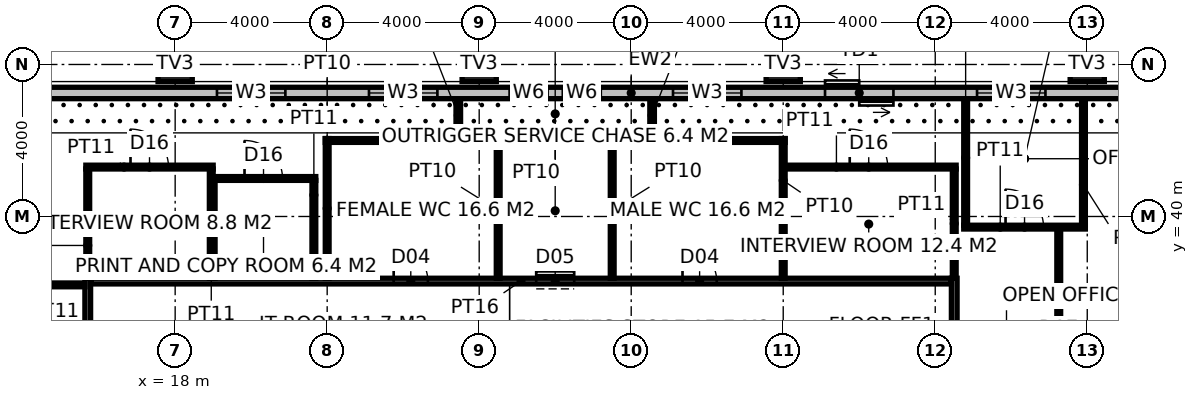
"""IFC4 building model, lengths in metres.
Left out: names, types, materials, properties, quantities, classifications, styles, units other than length and angle.
Written with IfcOpenShell. Run it as: python <this file> out.ifc"""

import sys

from ifc_helpers import new_model, si_unit, direction, frame, frame_2d, origin, origin_2d, place, context, subcontext, project, spatial, rectangle, hollow_rectangle, extrude, element, fill, save


model = new_model("IFC4")
c1 = context("Model", 3, precision=1e-05, world=origin(), true_north=direction((0.0, 1.0)))
c2 = subcontext(c1, "Body", "Model", "MODEL_VIEW")
j1 = project(units=[si_unit("LENGTHUNIT", "METRE"), si_unit("PLANEANGLEUNIT", "RADIAN")], contexts=[c1])
p1 = place(None, origin())
s1 = spatial("IfcSite", under=j1, at=p1, CompositionType="ELEMENT")
p2 = place(p1, origin())
s2 = spatial("IfcBuilding", under=s1, at=p2, CompositionType="ELEMENT")
p3 = place(p2, frame((0.0, 0.0, 238.2)))
s3 = spatial("IfcBuildingStorey", under=s2, at=p3, CompositionType="ELEMENT", Elevation=238.2)
for number, where, z_axis, x_axis in (
    (1, (18.0, 44.0, 0.0), (0.0, 0.0, 1.0), (1.0, 0.0, 0.0)),
    (2, (26.0, 44.0, 0.0), (0.0, 0.0, 1.0), (1.0, 0.0, 0.0)),
    (3, (34.0, 44.0, 0.0), (0.0, 0.0, 1.0), (1.0, 0.0, 0.0)),
    (4, (42.0, 44.0, 0.0), (0.0, 0.0, 1.0), (1.0, 0.0, 0.0)),
):
    element("IfcColumn", number, at=place(p3, frame(where, z_axis=z_axis, x_axis=x_axis)), inside=s3, PredefinedType="USERDEFINED", context=c2, shape_type="SweptSolid", body=[
        extrude(hollow_rectangle(XDim=0.9, YDim=0.9, WallThickness=0.08, at=origin_2d()), origin(), (0.0, 0.0, 1.0), 4.0),
    ])
p4 = place(p3, frame((15.7, 15.025, 0.0), z_axis=(0.0, 0.0, 1.0), x_axis=(0.0, 1.0, 0.0)))
e5 = element("IfcWall", 5, at=p4, inside=s3, PredefinedType="PARTITIONING", context=c2, shape_type="SweptSolid", body=[
    extrude(rectangle(XDim=23.35, YDim=0.15, at=frame_2d((11.675, 0.0))), origin(), (0.0, 0.0, 1.0), 3.85),
])
p5 = place(p4, frame((3.374, 0.0, 0.0)))
e6 = element("IfcOpeningElement", 6, at=p5, cuts=e5, PredefinedType="OPENING", context=c2, shape_type="SweptSolid", body=[
    extrude(rectangle(XDim=1.8, YDim=2.4, at=frame_2d((0.9, 1.2))), frame((0.0, 0.085, 0.0), z_axis=(0.0, -1.0, 0.0), x_axis=(1.0, 0.0, 0.0)), (0.0, 0.0, 1.0), 0.17),
])
p6 = place(p4, frame((17.476, 0.0, 0.0)))
e7 = element("IfcOpeningElement", 7, at=p6, cuts=e5, PredefinedType="OPENING", context=c2, shape_type="SweptSolid", body=[
    extrude(rectangle(XDim=1.8, YDim=2.4, at=frame_2d((0.9, 1.2))), frame((0.0, 0.085, 0.0), z_axis=(0.0, -1.0, 0.0), x_axis=(1.0, 0.0, 0.0)), (0.0, 0.0, 1.0), 0.17),
])
p7 = place(p4, frame((10.475, 0.0, 0.0)))
e8 = element("IfcOpeningElement", 8, at=p7, cuts=e5, PredefinedType="OPENING", context=c2, shape_type="SweptSolid", body=[
    extrude(rectangle(XDim=1.0, YDim=2.2, at=frame_2d((0.5, 1.1))), frame((0.0, 0.085, 0.0), z_axis=(0.0, -1.0, 0.0), x_axis=(1.0, 0.0, 0.0)), (0.0, 0.0, 1.0), 0.17),
])
p8 = place(p3, frame((38.5, 15.025, 0.0), z_axis=(0.0, 0.0, 1.0), x_axis=(0.0, 1.0, 0.0)))
e9 = element("IfcWall", 9, at=p8, inside=s3, PredefinedType="PARTITIONING", context=c2, shape_type="SweptSolid", body=[
    extrude(rectangle(XDim=23.35, YDim=0.15, at=frame_2d((11.675, 0.0))), origin(), (0.0, 0.0, 1.0), 2.65),
])
p9 = place(p8, frame((3.374, 0.0, 0.0)))
e10 = element("IfcOpeningElement", 10, at=p9, cuts=e9, PredefinedType="OPENING", context=c2, shape_type="SweptSolid", body=[
    extrude(rectangle(XDim=1.8, YDim=2.4, at=frame_2d((0.9, 1.2))), frame((0.0, 0.085, 0.0), z_axis=(0.0, -1.0, 0.0), x_axis=(1.0, 0.0, 0.0)), (0.0, 0.0, 1.0), 0.17),
])
p10 = place(p8, frame((17.476, 0.0, 0.0)))
e11 = element("IfcOpeningElement", 11, at=p10, cuts=e9, PredefinedType="OPENING", context=c2, shape_type="SweptSolid", body=[
    extrude(rectangle(XDim=1.8, YDim=2.4, at=frame_2d((0.9, 1.2))), frame((0.0, 0.085, 0.0), z_axis=(0.0, -1.0, 0.0), x_axis=(1.0, 0.0, 0.0)), (0.0, 0.0, 1.0), 0.17),
])
p11 = place(p8, frame((10.475, 0.0, 0.0)))
e12 = element("IfcOpeningElement", 12, at=p11, cuts=e9, PredefinedType="OPENING", context=c2, shape_type="SweptSolid", body=[
    extrude(rectangle(XDim=1.0, YDim=2.2, at=frame_2d((0.5, 1.1))), frame((0.0, 0.085, 0.0), z_axis=(0.0, -1.0, 0.0), x_axis=(1.0, 0.0, 0.0)), (0.0, 0.0, 1.0), 0.17),
])
p12 = place(p3, frame((15.775, 38.3, 0.0), z_axis=(0.0, 0.0, 1.0), x_axis=(1.0, 0.0, 0.0)))
e13 = element("IfcWall", 13, at=p12, inside=s3, PredefinedType="PARTITIONING", context=c2, shape_type="SweptSolid", body=[
    extrude(rectangle(XDim=22.65, YDim=0.15, at=frame_2d((11.325, 0.0))), origin(), (0.0, 0.0, 1.0), 3.85),
])
p13 = place(p12, frame((7.975, 0.0, 0.0)))
e14 = element("IfcOpeningElement", 14, at=p13, cuts=e13, PredefinedType="OPENING", context=c2, shape_type="SweptSolid", body=[
    extrude(rectangle(XDim=0.9, YDim=2.1, at=frame_2d((0.45, 1.05))), frame((0.0, 0.085, 0.0), z_axis=(0.0, -1.0, 0.0), x_axis=(1.0, 0.0, 0.0)), (0.0, 0.0, 1.0), 0.17),
])
p14 = place(p12, frame((11.725, 0.0, 0.0)))
e15 = element("IfcOpeningElement", 15, at=p14, cuts=e13, PredefinedType="OPENING", context=c2, shape_type="SweptSolid", body=[
    extrude(rectangle(XDim=1.0, YDim=2.1, at=frame_2d((0.5, 1.05))), frame((0.0, 0.085, 0.0), z_axis=(0.0, -1.0, 0.0), x_axis=(1.0, 0.0, 0.0)), (0.0, 0.0, 1.0), 0.17),
])
p15 = place(p12, frame((15.575, 0.0, 0.0)))
e16 = element("IfcOpeningElement", 16, at=p15, cuts=e13, PredefinedType="OPENING", context=c2, shape_type="SweptSolid", body=[
    extrude(rectangle(XDim=0.9, YDim=2.1, at=frame_2d((0.45, 1.05))), frame((0.0, 0.085, 0.0), z_axis=(0.0, -1.0, 0.0), x_axis=(1.0, 0.0, 0.0)), (0.0, 0.0, 1.0), 0.17),
])
for number, where, z_axis, x_axis in (
    (17, (22.0, 38.375, 0.0), (0.0, 0.0, 1.0), (0.0, 1.0, 0.0)),
    (18, (34.0, 38.375, 0.0), (0.0, 0.0, 1.0), (0.0, 1.0, 0.0)),
):
    element("IfcWall", number, at=place(p3, frame(where, z_axis=z_axis, x_axis=x_axis)), inside=s3, PredefinedType="PARTITIONING", context=c2, shape_type="SweptSolid", body=[
        extrude(rectangle(XDim=3.675, YDim=0.1, at=frame_2d((1.837, 0.0))), origin(), (0.0, 0.0, 1.0), 2.65),
    ])
p16 = place(p3, frame((21.95, 42.0, 0.0), z_axis=(0.0, 0.0, 1.0), x_axis=(1.0, 0.0, 0.0)))
e19 = element("IfcWall", 19, at=p16, inside=s3, PredefinedType="PARTITIONING", context=c2, shape_type="SweptSolid", body=[
    extrude(rectangle(XDim=12.1, YDim=0.1, at=frame_2d((6.05, 0.0))), origin(), (0.0, 0.0, 1.0), 3.85),
])
for number, where, z_axis, x_axis in (
    (20, (26.5, 38.375, 0.0), (0.0, 0.0, 1.0), (0.0, 1.0, 0.0)),
    (21, (29.5, 38.375, 0.0), (0.0, 0.0, 1.0), (0.0, 1.0, 0.0)),
):
    element("IfcWall", number, at=place(p3, frame(where, z_axis=z_axis, x_axis=x_axis)), inside=s3, PredefinedType="PARTITIONING", context=c2, shape_type="SweptSolid", body=[
        extrude(rectangle(XDim=3.575, YDim=0.1, at=frame_2d((1.788, 0.0))), origin(), (0.0, 0.0, 1.0), 2.65),
    ])
for number, where, z_axis, x_axis in (
    (22, (25.45, 42.0, 0.0), (0.0, 0.0, 1.0), (0.0, 1.0, 0.0)),
    (23, (30.55, 42.0, 0.0), (0.0, 0.0, 1.0), (0.0, 1.0, 0.0)),
):
    element("IfcWall", number, at=place(p3, frame(where, z_axis=z_axis, x_axis=x_axis)), inside=s3, PredefinedType="PARTITIONING", context=c2, shape_type="SweptSolid", body=[
        extrude(rectangle(XDim=1.32, YDim=0.12, at=frame_2d((0.66, 0.0))), origin(), (0.0, 0.0, 1.0), 2.65),
    ])
p17 = place(p3, frame((12.65, 38.2, 0.0), z_axis=(0.0, 0.0, 1.0), x_axis=(1.0, 0.0, 0.0)))
e24 = element("IfcWall", 24, at=p17, inside=s3, PredefinedType="PARTITIONING", context=c2, shape_type="SweptSolid", body=[
    extrude(rectangle(XDim=2.975, YDim=0.1, at=frame_2d((1.488, 0.0))), origin(), (0.0, 0.0, 1.0), 3.85),
])
p18 = place(p3, frame((38.75, 39.72, 0.0), z_axis=(0.0, 0.0, 1.0), x_axis=(1.0, 0.0, 0.0)))
e25 = element("IfcWall", 25, at=p18, inside=s3, PredefinedType="PARTITIONING", context=c2, shape_type="SweptSolid", body=[
    extrude(rectangle(XDim=3.2, YDim=0.1, at=frame_2d((1.6, 0.0))), origin(), (0.0, 0.0, 1.0), 3.85),
])
p19 = place(p18, frame((1.1, 0.0, 0.0)))
e26 = element("IfcOpeningElement", 26, at=p19, cuts=e25, PredefinedType="OPENING", context=c2, shape_type="SweptSolid", body=[
    extrude(rectangle(XDim=1.0, YDim=2.2, at=frame_2d((0.5, 1.1))), frame((0.0, 0.06, 0.0), z_axis=(0.0, -1.0, 0.0), x_axis=(1.0, 0.0, 0.0)), (0.0, 0.0, 1.0), 0.12),
])
p20 = place(p3, frame((18.95, 41.0, 0.0), z_axis=(0.0, 0.0, 1.0), x_axis=(1.0, 0.0, 0.0)))
e27 = element("IfcWall", 27, at=p20, inside=s3, PredefinedType="PARTITIONING", context=c2, shape_type="SweptSolid", body=[
    extrude(rectangle(XDim=2.75, YDim=0.1, at=frame_2d((1.375, 0.0))), origin(), (0.0, 0.0, 1.0), 3.85),
])
p21 = place(p20, frame((0.875, 0.0, 0.0)))
e28 = element("IfcOpeningElement", 28, at=p21, cuts=e27, PredefinedType="OPENING", context=c2, shape_type="SweptSolid", body=[
    extrude(rectangle(XDim=1.0, YDim=2.2, at=frame_2d((0.5, 1.1))), frame((0.0, 0.06, 0.0), z_axis=(0.0, -1.0, 0.0), x_axis=(1.0, 0.0, 0.0)), (0.0, 0.0, 1.0), 0.12),
])
p22 = place(p3, frame((15.65, 41.3, 0.0), z_axis=(0.0, 0.0, 1.0), x_axis=(1.0, 0.0, 0.0)))
e29 = element("IfcWall", 29, at=p22, inside=s3, PredefinedType="PARTITIONING", context=c2, shape_type="SweptSolid", body=[
    extrude(rectangle(XDim=3.35, YDim=0.1, at=frame_2d((1.675, 0.0))), origin(), (0.0, 0.0, 1.0), 3.85),
])
p23 = place(p22, frame((1.175, 0.0, 0.0)))
e30 = element("IfcOpeningElement", 30, at=p23, cuts=e29, PredefinedType="OPENING", context=c2, shape_type="SweptSolid", body=[
    extrude(rectangle(XDim=1.0, YDim=2.2, at=frame_2d((0.5, 1.1))), frame((0.0, 0.06, 0.0), z_axis=(0.0, -1.0, 0.0), x_axis=(1.0, 0.0, 0.0)), (0.0, 0.0, 1.0), 0.12),
])
p24 = place(p3, frame((34.05, 41.3, 0.0), z_axis=(0.0, 0.0, 1.0), x_axis=(1.0, 0.0, 0.0)))
e31 = element("IfcWall", 31, at=p24, inside=s3, PredefinedType="PARTITIONING", context=c2, shape_type="SweptSolid", body=[
    extrude(rectangle(XDim=4.5, YDim=0.1, at=frame_2d((2.25, 0.0))), origin(), (0.0, 0.0, 1.0), 3.85),
])
p25 = place(p24, frame((1.7, 0.0, 0.0)))
e32 = element("IfcOpeningElement", 32, at=p25, cuts=e31, PredefinedType="OPENING", context=c2, shape_type="SweptSolid", body=[
    extrude(rectangle(XDim=1.0, YDim=2.2, at=frame_2d((0.5, 1.1))), frame((0.0, 0.06, 0.0), z_axis=(0.0, -1.0, 0.0), x_axis=(1.0, 0.0, 0.0)), (0.0, 0.0, 1.0), 0.12),
])
for number, where, z_axis, x_axis in (
    (33, (15.7, 38.375, 0.0), (0.0, 0.0, 1.0), (0.0, 1.0, 0.0)),
    (34, (18.95, 38.375, 0.0), (0.0, 0.0, 1.0), (0.0, 1.0, 0.0)),
):
    element("IfcWall", number, at=place(p3, frame(where, z_axis=z_axis, x_axis=x_axis)), inside=s3, PredefinedType="PARTITIONING", context=c2, shape_type="SweptSolid", body=[
        extrude(rectangle(XDim=2.875, YDim=0.1, at=frame_2d((1.438, 0.0))), origin(), (0.0, 0.0, 1.0), 3.85),
    ])
p26 = place(p3, frame((19.0, 38.375, 0.0), z_axis=(0.0, 0.0, 1.0), x_axis=(0.0, 1.0, 0.0)))
e35 = element("IfcWall", 35, at=p26, inside=s3, PredefinedType="PARTITIONING", context=c2, shape_type="SweptSolid", body=[
    extrude(rectangle(XDim=2.575, YDim=0.1, at=frame_2d((1.288, 0.0))), origin(), (0.0, 0.0, 1.0), 3.85),
])
p27 = place(p3, frame((21.65, 38.375, 0.0), z_axis=(0.0, 0.0, 1.0), x_axis=(0.0, 1.0, 0.0)))
e36 = element("IfcWall", 36, at=p27, inside=s3, PredefinedType="PARTITIONING", context=c2, shape_type="SweptSolid", body=[
    extrude(rectangle(XDim=2.575, YDim=0.1, at=frame_2d((1.288, 0.0))), origin(), (0.0, 0.0, 1.0), 2.65),
])
p28 = place(p3, frame((38.5, 38.375, 0.0), z_axis=(0.0, 0.0, 1.0), x_axis=(0.0, 1.0, 0.0)))
e37 = element("IfcWall", 37, at=p28, inside=s3, PredefinedType="PARTITIONING", context=c2, shape_type="SweptSolid", body=[
    extrude(rectangle(XDim=2.875, YDim=0.1, at=frame_2d((1.438, 0.0))), origin(), (0.0, 0.0, 1.0), 2.65),
])
p29 = place(p3, frame((38.8, 39.77, 0.0), z_axis=(0.0, 0.0, 1.0), x_axis=(0.0, 1.0, 0.0)))
e38 = element("IfcWall", 38, at=p29, inside=s3, PredefinedType="PARTITIONING", context=c2, shape_type="SweptSolid", body=[
    extrude(rectangle(XDim=3.55, YDim=0.1, at=frame_2d((1.775, 0.0))), origin(), (0.0, 0.0, 1.0), 3.85),
])
p30 = place(p3, frame((41.9, 39.77, 0.0), z_axis=(0.0, 0.0, 1.0), x_axis=(0.0, 1.0, 0.0)))
e39 = element("IfcWall", 39, at=p30, inside=s3, PredefinedType="PARTITIONING", context=c2, shape_type="SweptSolid", body=[
    extrude(rectangle(XDim=3.55, YDim=0.1, at=frame_2d((1.775, 0.0))), origin(), (0.0, 0.0, 1.0), 2.65),
])
p31 = place(p3, frame((41.25, 32.2, 0.0), z_axis=(0.0, 0.0, 1.0), x_axis=(0.0, 1.0, 0.0)))
e40 = element("IfcWall", 40, at=p31, inside=s3, PredefinedType="PARTITIONING", context=c2, shape_type="SweptSolid", body=[
    extrude(rectangle(XDim=7.47, YDim=0.1, at=frame_2d((3.735, 0.0))), origin(), (0.0, 0.0, 1.0), 3.85),
])
p32 = place(p31, frame((3.235, 0.0, 0.0)))
e41 = element("IfcOpeningElement", 41, at=p32, cuts=e40, PredefinedType="OPENING", context=c2, shape_type="SweptSolid", body=[
    extrude(rectangle(XDim=1.0, YDim=2.2, at=frame_2d((0.5, 1.1))), frame((0.0, 0.06, 0.0), z_axis=(0.0, -1.0, 0.0), x_axis=(1.0, 0.0, 0.0)), (0.0, 0.0, 1.0), 0.12),
])
p33 = place(p3, frame((46.4, 43.25, 0.0), z_axis=(0.0, 0.0, 1.0), x_axis=(-1.0, 0.0, 0.0)))
e42 = element("IfcWall", 42, at=p33, inside=s3, PredefinedType="ELEMENTEDWALL", context=c2, shape_type="SweptSolid", body=[
    extrude(rectangle(XDim=32.8, YDim=0.3, at=frame_2d((16.4, 0.0))), origin(), (0.0, 0.0, 1.0), 3.85),
])
p34 = place(p33, frame((25.5, 0.0, 0.8)))
e43 = element("IfcOpeningElement", 43, at=p34, cuts=e42, PredefinedType="OPENING", context=c2, shape_type="SweptSolid", body=[
    extrude(rectangle(XDim=1.8, YDim=2.4, at=frame_2d((0.9, 1.2))), frame((0.0, 0.16, 0.0), z_axis=(0.0, -1.0, 0.0), x_axis=(1.0, 0.0, 0.0)), (0.0, 0.0, 1.0), 0.32),
])
p35 = place(p33, frame((21.5, 0.0, 0.8)))
e44 = element("IfcOpeningElement", 44, at=p35, cuts=e42, PredefinedType="OPENING", context=c2, shape_type="SweptSolid", body=[
    extrude(rectangle(XDim=1.8, YDim=2.4, at=frame_2d((0.9, 1.2))), frame((0.0, 0.16, 0.0), z_axis=(0.0, -1.0, 0.0), x_axis=(1.0, 0.0, 0.0)), (0.0, 0.0, 1.0), 0.32),
])
p36 = place(p33, frame((18.6, 0.0, 0.8)))
e45 = element("IfcOpeningElement", 45, at=p36, cuts=e42, PredefinedType="OPENING", context=c2, shape_type="SweptSolid", body=[
    extrude(rectangle(XDim=1.0, YDim=2.4, at=frame_2d((0.5, 1.2))), frame((0.0, 0.16, 0.0), z_axis=(0.0, -1.0, 0.0), x_axis=(1.0, 0.0, 0.0)), (0.0, 0.0, 1.0), 0.32),
])
p37 = place(p33, frame((17.2, 0.0, 0.8)))
e46 = element("IfcOpeningElement", 46, at=p37, cuts=e42, PredefinedType="OPENING", context=c2, shape_type="SweptSolid", body=[
    extrude(rectangle(XDim=1.0, YDim=2.4, at=frame_2d((0.5, 1.2))), frame((0.0, 0.16, 0.0), z_axis=(0.0, -1.0, 0.0), x_axis=(1.0, 0.0, 0.0)), (0.0, 0.0, 1.0), 0.32),
])
p38 = place(p33, frame((13.5, 0.0, 0.8)))
e47 = element("IfcOpeningElement", 47, at=p38, cuts=e42, PredefinedType="OPENING", context=c2, shape_type="SweptSolid", body=[
    extrude(rectangle(XDim=1.8, YDim=2.4, at=frame_2d((0.9, 1.2))), frame((0.0, 0.16, 0.0), z_axis=(0.0, -1.0, 0.0), x_axis=(1.0, 0.0, 0.0)), (0.0, 0.0, 1.0), 0.32),
])
p39 = place(p33, frame((9.5, 0.0, 0.0)))
e48 = element("IfcOpeningElement", 48, at=p39, cuts=e42, PredefinedType="OPENING", context=c2, shape_type="SweptSolid", body=[
    extrude(rectangle(XDim=1.8, YDim=2.4, at=frame_2d((0.9, 1.2))), frame((0.0, 0.16, 0.0), z_axis=(0.0, -1.0, 0.0), x_axis=(1.0, 0.0, 0.0)), (0.0, 0.0, 1.0), 0.32),
])
p40 = place(p33, frame((5.5, 0.0, 0.8)))
e49 = element("IfcOpeningElement", 49, at=p40, cuts=e42, PredefinedType="OPENING", context=c2, shape_type="SweptSolid", body=[
    extrude(rectangle(XDim=1.8, YDim=2.4, at=frame_2d((0.9, 1.2))), frame((0.0, 0.16, 0.0), z_axis=(0.0, -1.0, 0.0), x_axis=(1.0, 0.0, 0.0)), (0.0, 0.0, 1.0), 0.32),
])
p41 = place(p13, origin())
e50 = element("IfcDoor", 50, at=p41, inside=s3, OperationType="SINGLE_SWING_LEFT", PredefinedType="DOOR", context=c2, shape_type="SweptSolid", body=[
    extrude(rectangle(XDim=0.9, YDim=2.1, at=frame_2d((0.45, 1.05))), frame((0.0, 0.025, 0.0), z_axis=(0.0, -1.0, 0.0), x_axis=(1.0, 0.0, 0.0)), (0.0, 0.0, 1.0), 0.05),
])
fill(e14, e50)
p42 = place(p14, origin())
e51 = element("IfcDoor", 51, at=p42, inside=s3, OperationType="SLIDING_TO_LEFT", PredefinedType="DOOR", context=c2, shape_type="SweptSolid", body=[
    extrude(rectangle(XDim=1.0, YDim=2.1, at=frame_2d((0.5, 1.05))), frame((0.0, 0.025, 0.0), z_axis=(0.0, -1.0, 0.0), x_axis=(1.0, 0.0, 0.0)), (0.0, 0.0, 1.0), 0.05),
])
fill(e15, e51)
p43 = place(p15, origin())
e52 = element("IfcDoor", 52, at=p43, inside=s3, OperationType="SINGLE_SWING_LEFT", PredefinedType="DOOR", context=c2, shape_type="SweptSolid", body=[
    extrude(rectangle(XDim=0.9, YDim=2.1, at=frame_2d((0.45, 1.05))), frame((0.0, 0.025, 0.0), z_axis=(0.0, -1.0, 0.0), x_axis=(1.0, 0.0, 0.0)), (0.0, 0.0, 1.0), 0.05),
])
fill(e16, e52)
p44 = place(p23, origin())
e53 = element("IfcDoor", 53, at=p44, inside=s3, OperationType="SINGLE_SWING_LEFT", PredefinedType="DOOR", context=c2, shape_type="SweptSolid", body=[
    extrude(rectangle(XDim=1.0, YDim=2.2, at=frame_2d((0.5, 1.1))), frame((0.0, 0.025, 0.0), z_axis=(0.0, -1.0, 0.0), x_axis=(1.0, 0.0, 0.0)), (0.0, 0.0, 1.0), 0.05),
])
fill(e30, e53)
p45 = place(p25, origin())
e54 = element("IfcDoor", 54, at=p45, inside=s3, OperationType="SINGLE_SWING_LEFT", PredefinedType="DOOR", context=c2, shape_type="SweptSolid", body=[
    extrude(rectangle(XDim=1.0, YDim=2.2, at=frame_2d((0.5, 1.1))), frame((0.0, 0.025, 0.0), z_axis=(0.0, -1.0, 0.0), x_axis=(1.0, 0.0, 0.0)), (0.0, 0.0, 1.0), 0.05),
])
fill(e32, e54)
p46 = place(p21, origin())
e55 = element("IfcDoor", 55, at=p46, inside=s3, OperationType="SINGLE_SWING_LEFT", PredefinedType="DOOR", context=c2, shape_type="SweptSolid", body=[
    extrude(rectangle(XDim=1.0, YDim=2.2, at=frame_2d((0.5, 1.1))), frame((0.0, 0.025, 0.0), z_axis=(0.0, -1.0, 0.0), x_axis=(1.0, 0.0, 0.0)), (0.0, 0.0, 1.0), 0.05),
])
fill(e28, e55)
p47 = place(p19, origin())
e56 = element("IfcDoor", 56, at=p47, inside=s3, OperationType="SINGLE_SWING_LEFT", PredefinedType="DOOR", context=c2, shape_type="SweptSolid", body=[
    extrude(rectangle(XDim=1.0, YDim=2.2, at=frame_2d((0.5, 1.1))), frame((0.0, 0.025, 0.0), z_axis=(0.0, -1.0, 0.0), x_axis=(1.0, 0.0, 0.0)), (0.0, 0.0, 1.0), 0.05),
])
fill(e26, e56)
p48 = place(p34, origin())
e57 = element("IfcWindow", 57, at=p48, inside=s3, PartitioningType="SINGLE_PANEL", PredefinedType="WINDOW", context=c2, shape_type="SweptSolid", body=[
    extrude(rectangle(XDim=1.8, YDim=2.4, at=frame_2d((0.9, 1.2))), frame((0.0, 0.03, 0.0), z_axis=(0.0, -1.0, 0.0), x_axis=(1.0, 0.0, 0.0)), (0.0, 0.0, 1.0), 0.06),
])
fill(e43, e57)
p49 = place(p35, origin())
e58 = element("IfcWindow", 58, at=p49, inside=s3, PartitioningType="SINGLE_PANEL", PredefinedType="WINDOW", context=c2, shape_type="SweptSolid", body=[
    extrude(rectangle(XDim=1.8, YDim=2.4, at=frame_2d((0.9, 1.2))), frame((0.0, 0.03, 0.0), z_axis=(0.0, -1.0, 0.0), x_axis=(1.0, 0.0, 0.0)), (0.0, 0.0, 1.0), 0.06),
])
fill(e44, e58)
p50 = place(p36, origin())
e59 = element("IfcWindow", 59, at=p50, inside=s3, PartitioningType="SINGLE_PANEL", PredefinedType="WINDOW", context=c2, shape_type="SweptSolid", body=[
    extrude(rectangle(XDim=1.0, YDim=2.4, at=frame_2d((0.5, 1.2))), frame((0.0, 0.03, 0.0), z_axis=(0.0, -1.0, 0.0), x_axis=(1.0, 0.0, 0.0)), (0.0, 0.0, 1.0), 0.06),
])
fill(e45, e59)
p51 = place(p37, origin())
e60 = element("IfcWindow", 60, at=p51, inside=s3, PartitioningType="SINGLE_PANEL", PredefinedType="WINDOW", context=c2, shape_type="SweptSolid", body=[
    extrude(rectangle(XDim=1.0, YDim=2.4, at=frame_2d((0.5, 1.2))), frame((0.0, 0.03, 0.0), z_axis=(0.0, -1.0, 0.0), x_axis=(1.0, 0.0, 0.0)), (0.0, 0.0, 1.0), 0.06),
])
fill(e46, e60)
p52 = place(p38, origin())
e61 = element("IfcWindow", 61, at=p52, inside=s3, PartitioningType="SINGLE_PANEL", PredefinedType="WINDOW", context=c2, shape_type="SweptSolid", body=[
    extrude(rectangle(XDim=1.8, YDim=2.4, at=frame_2d((0.9, 1.2))), frame((0.0, 0.03, 0.0), z_axis=(0.0, -1.0, 0.0), x_axis=(1.0, 0.0, 0.0)), (0.0, 0.0, 1.0), 0.06),
])
fill(e47, e61)
p53 = place(p39, origin())
e62 = element("IfcDoor", 62, at=p53, inside=s3, OperationType="DOUBLE_DOOR_SLIDING", PredefinedType="DOOR", context=c2, shape_type="SweptSolid", body=[
    extrude(rectangle(XDim=1.8, YDim=2.4, at=frame_2d((0.9, 1.2))), frame((0.0, 0.025, 0.0), z_axis=(0.0, -1.0, 0.0), x_axis=(1.0, 0.0, 0.0)), (0.0, 0.0, 1.0), 0.05),
])
fill(e48, e62)
p54 = place(p40, origin())
e63 = element("IfcWindow", 63, at=p54, inside=s3, PartitioningType="SINGLE_PANEL", PredefinedType="WINDOW", context=c2, shape_type="SweptSolid", body=[
    extrude(rectangle(XDim=1.8, YDim=2.4, at=frame_2d((0.9, 1.2))), frame((0.0, 0.03, 0.0), z_axis=(0.0, -1.0, 0.0), x_axis=(1.0, 0.0, 0.0)), (0.0, 0.0, 1.0), 0.06),
])
fill(e49, e63)
save(model, sys.argv[1])
